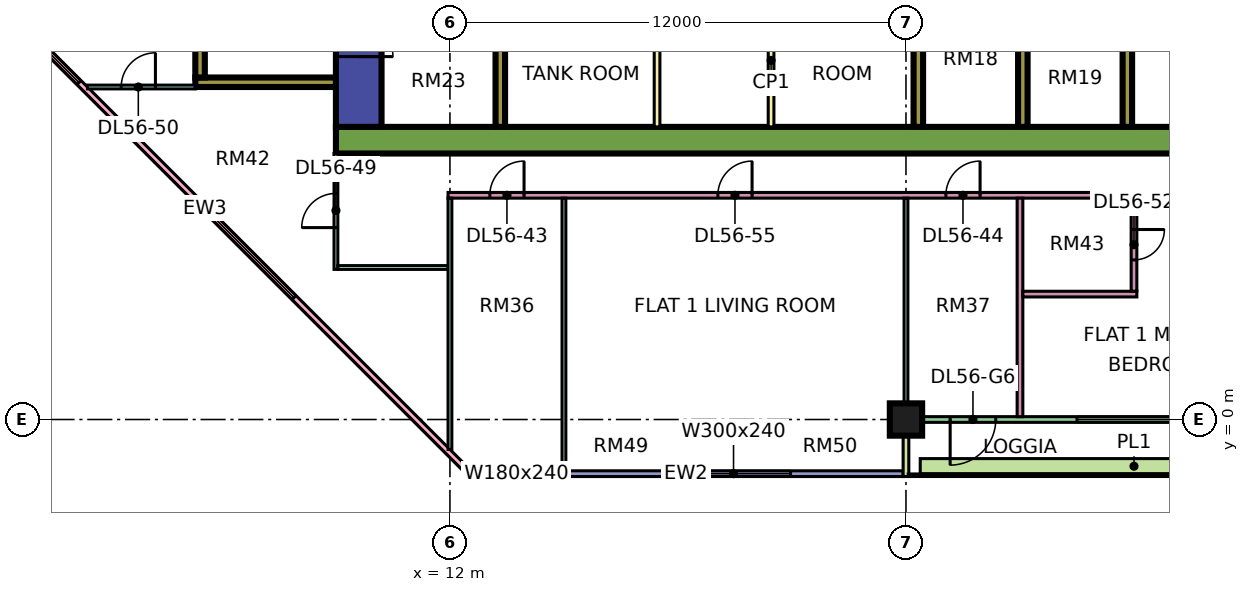
"""IFC4 building model, lengths in metres.
Left out: names, types, materials, properties, quantities, classifications, styles, units other than length and angle.
Written with IfcOpenShell. Run it as: python <this file> out.ifc"""

import sys

from ifc_helpers import new_model, si_unit, direction, frame, frame_2d, origin, origin_2d, place, context, subcontext, project, spatial, rectangle, extrude, element, fill, save


model = new_model("IFC4")
c1 = context("Model", 3, precision=1e-05, world=origin(), true_north=direction((0.0, 1.0)))
c2 = subcontext(c1, "Body", "Model", "MODEL_VIEW")
j1 = project(units=[si_unit("LENGTHUNIT", "METRE"), si_unit("PLANEANGLEUNIT", "RADIAN")], contexts=[c1])
p1 = place(None, origin())
s1 = spatial("IfcSite", under=j1, at=p1, CompositionType="ELEMENT")
p2 = place(p1, origin())
s2 = spatial("IfcBuilding", under=s1, at=p2, CompositionType="ELEMENT")
p3 = place(p2, frame((0.0, 0.0, 237.9)))
s3 = spatial("IfcBuildingStorey", under=s2, at=p3, CompositionType="ELEMENT", Elevation=237.9)
p4 = place(p3, frame((24.0, 0.0, 0.0), z_axis=(0.0, 0.0, 1.0), x_axis=(1.0, 0.0, 0.0)))
e1 = element("IfcColumn", 1, at=p4, inside=s3, PredefinedType="COLUMN", context=c2, shape_type="SweptSolid", body=[
    extrude(rectangle(XDim=0.85, YDim=0.85, at=origin_2d()), origin(), (0.0, 0.0, 1.0), 3.75),
])
p5 = place(p3, frame((9.0, 7.35, 0.0), z_axis=(0.0, 0.0, 1.0), x_axis=(1.0, 0.0, 0.0)))
e2 = element("IfcWall", 2, at=p5, inside=s3, PredefinedType="SHEAR", context=c2, shape_type="SweptSolid", body=[
    extrude(rectangle(XDim=25.0, YDim=0.7, at=frame_2d((12.5, 0.0))), origin(), (0.0, 0.0, 1.0), 3.75),
])
p6 = place(p3, frame((9.6, 7.7, 0.0), z_axis=(0.0, 0.0, 1.0), x_axis=(0.0, 1.0, 0.0)))
e3 = element("IfcWall", 3, at=p6, inside=s3, PredefinedType="SHEAR", context=c2, shape_type="SweptSolid", body=[
    extrude(rectangle(XDim=11.6, YDim=1.2, at=frame_2d((5.8, 0.0))), origin(), (0.0, 0.0, 1.0), 3.75),
])
p7 = place(p6, frame((4.175, 0.0, 0.0)))
e4 = element("IfcOpeningElement", 4, at=p7, cuts=e3, PredefinedType="OPENING", context=c2, shape_type="SweptSolid", body=[
    extrude(rectangle(XDim=1.1, YDim=2.2, at=frame_2d((0.55, 1.1))), frame((0.0, 0.61, 0.0), z_axis=(0.0, -1.0, 0.0), x_axis=(1.0, 0.0, 0.0)), (0.0, 0.0, 1.0), 1.22),
])
p8 = place(p6, frame((6.675, 0.0, 0.0)))
e5 = element("IfcOpeningElement", 5, at=p8, cuts=e3, PredefinedType="OPENING", context=c2, shape_type="SweptSolid", body=[
    extrude(rectangle(XDim=1.1, YDim=2.2, at=frame_2d((0.55, 1.1))), frame((0.0, 0.61, 0.0), z_axis=(0.0, -1.0, 0.0), x_axis=(1.0, 0.0, 0.0)), (0.0, 0.0, 1.0), 1.22),
])
p9 = place(p6, frame((9.55, 0.0, 0.0)))
e6 = element("IfcOpeningElement", 6, at=p9, cuts=e3, PredefinedType="OPENING", context=c2, shape_type="SweptSolid", body=[
    extrude(rectangle(XDim=1.1, YDim=2.2, at=frame_2d((0.55, 1.1))), frame((0.0, 0.61, 0.0), z_axis=(0.0, -1.0, 0.0), x_axis=(1.0, 0.0, 0.0)), (0.0, 0.0, 1.0), 1.22),
])
p10 = place(p6, frame((1.85, 0.0, 0.0)))
e7 = element("IfcOpeningElement", 7, at=p10, cuts=e3, PredefinedType="OPENING", context=c2, shape_type="SweptSolid", body=[
    extrude(rectangle(XDim=0.9, YDim=2.1, at=frame_2d((0.45, 1.05))), frame((0.0, 0.61, 0.0), z_axis=(0.0, -1.0, 0.0), x_axis=(1.0, 0.0, 0.0)), (0.0, 0.0, 1.0), 1.22),
])
p11 = place(p3, frame((13.325, 7.7, 0.0), z_axis=(0.0, 0.0, 1.0), x_axis=(0.0, 1.0, 0.0)))
e8 = element("IfcWall", 8, at=p11, inside=s3, PredefinedType="SHEAR", context=c2, shape_type="SweptSolid", body=[
    extrude(rectangle(XDim=11.6, YDim=0.25, at=frame_2d((5.8, 0.0))), origin(), (0.0, 0.0, 1.0), 3.75),
])
for number, where, z_axis, x_axis in (
    (9, (24.325, 7.7, 0.0), (0.0, 0.0, 1.0), (0.0, 1.0, 0.0)),
    (10, (27.075, 7.7, 0.0), (0.0, 0.0, 1.0), (0.0, 1.0, 0.0)),
    (11, (29.825, 7.7, 0.0), (0.0, 0.0, 1.0), (0.0, 1.0, 0.0)),
):
    element("IfcWall", number, at=place(p3, frame(where, z_axis=z_axis, x_axis=x_axis)), inside=s3, PredefinedType="SHEAR", context=c2, shape_type="SweptSolid", body=[
        extrude(rectangle(XDim=3.5, YDim=0.25, at=frame_2d((1.75, 0.0))), origin(), (0.0, 0.0, 1.0), 3.75),
    ])
p12 = place(p3, frame((5.3, 8.875, 0.0), z_axis=(0.0, 0.0, 1.0), x_axis=(1.0, 0.0, 0.0)))
e12 = element("IfcWall", 12, at=p12, inside=s3, PredefinedType="SHEAR", context=c2, shape_type="SweptSolid", body=[
    extrude(rectangle(XDim=3.7, YDim=0.25, at=frame_2d((1.85, 0.0))), origin(), (0.0, 0.0, 1.0), 3.75),
])
p13 = place(p3, frame((5.425, 9.0, 0.0), z_axis=(0.0, 0.0, 1.0), x_axis=(0.0, 1.0, 0.0)))
e13 = element("IfcWall", 13, at=p13, inside=s3, PredefinedType="SHEAR", context=c2, shape_type="SweptSolid", body=[
    extrude(rectangle(XDim=4.0, YDim=0.25, at=frame_2d((2.0, 0.0))), origin(), (0.0, 0.0, 1.0), 3.75),
])
p14 = place(p3, frame((-1.447, 12.553, 0.0), z_axis=(0.0, 0.0, 1.0), x_axis=(0.707106781187, -0.707106781187, 0.0)))
e14 = element("IfcWall", 14, at=p14, inside=s3, PredefinedType="SOLIDWALL", context=c2, shape_type="SweptSolid", body=[
    extrude(rectangle(XDim=19.799, YDim=0.15, at=frame_2d((9.899, 0.0))), origin(), (0.0, 0.0, 1.0), 3.35),
])
p15 = place(p14, frame((2.212, 0.0, 0.45)))
e15 = element("IfcOpeningElement", 15, at=p15, cuts=e14, PredefinedType="OPENING", context=c2, shape_type="SweptSolid", body=[
    extrude(rectangle(XDim=3.0, YDim=2.4, at=frame_2d((1.5, 1.2))), frame((0.0, 0.085, 0.0), z_axis=(0.0, -1.0, 0.0), x_axis=(1.0, 0.0, 0.0)), (0.0, 0.0, 1.0), 0.17),
])
p16 = place(p14, frame((10.216, 0.0, 0.45)))
e16 = element("IfcOpeningElement", 16, at=p16, cuts=e14, PredefinedType="OPENING", context=c2, shape_type="SweptSolid", body=[
    extrude(rectangle(XDim=3.0, YDim=2.4, at=frame_2d((1.5, 1.2))), frame((0.0, 0.085, 0.0), z_axis=(0.0, -1.0, 0.0), x_axis=(1.0, 0.0, 0.0)), (0.0, 0.0, 1.0), 0.17),
])
p17 = place(p3, frame((12.5, -1.425, 0.0), z_axis=(0.0, 0.0, 1.0), x_axis=(1.0, 0.0, 0.0)))
e17 = element("IfcWall", 17, at=p17, inside=s3, PredefinedType="SOLIDWALL", context=c2, shape_type="SweptSolid", body=[
    extrude(rectangle(XDim=11.425, YDim=0.15, at=frame_2d((5.712, 0.0))), origin(), (0.0, 0.0, 1.0), 3.35),
])
p18 = place(p17, frame((0.35, 0.0, 0.45)))
e18 = element("IfcOpeningElement", 18, at=p18, cuts=e17, PredefinedType="OPENING", context=c2, shape_type="SweptSolid", body=[
    extrude(rectangle(XDim=1.8, YDim=2.4, at=frame_2d((0.9, 1.2))), frame((0.0, 0.085, 0.0), z_axis=(0.0, -1.0, 0.0), x_axis=(1.0, 0.0, 0.0)), (0.0, 0.0, 1.0), 0.17),
])
p19 = place(p17, frame((5.462, 0.0, 0.45)))
e19 = element("IfcOpeningElement", 19, at=p19, cuts=e17, PredefinedType="OPENING", context=c2, shape_type="SweptSolid", body=[
    extrude(rectangle(XDim=3.0, YDim=2.4, at=frame_2d((1.5, 1.2))), frame((0.0, 0.085, 0.0), z_axis=(0.0, -1.0, 0.0), x_axis=(1.0, 0.0, 0.0)), (0.0, 0.0, 1.0), 0.17),
])
p20 = place(p3, frame((24.075, 0.0, 0.0), z_axis=(0.0, 0.0, 1.0), x_axis=(1.0, 0.0, 0.0)))
e20 = element("IfcWall", 20, at=p20, inside=s3, PredefinedType="SOLIDWALL", context=c2, shape_type="SweptSolid", body=[
    extrude(rectangle(XDim=11.85, YDim=0.15, at=frame_2d((5.925, 0.0))), origin(), (0.0, 0.0, 1.0), 3.35),
])
p21 = place(p20, frame((1.087, 0.0, 0.0)))
e21 = element("IfcOpeningElement", 21, at=p21, cuts=e20, PredefinedType="OPENING", context=c2, shape_type="SweptSolid", body=[
    extrude(rectangle(XDim=1.2, YDim=2.4, at=frame_2d((0.6, 1.2))), frame((0.0, 0.085, 0.0), z_axis=(0.0, -1.0, 0.0), x_axis=(1.0, 0.0, 0.0)), (0.0, 0.0, 1.0), 0.17),
])
p22 = place(p20, frame((4.425, 0.0, 0.45)))
e22 = element("IfcOpeningElement", 22, at=p22, cuts=e20, PredefinedType="OPENING", context=c2, shape_type="SweptSolid", body=[
    extrude(rectangle(XDim=3.0, YDim=2.4, at=frame_2d((1.5, 1.2))), frame((0.0, 0.085, 0.0), z_axis=(0.0, -1.0, 0.0), x_axis=(1.0, 0.0, 0.0)), (0.0, 0.0, 1.0), 0.17),
])
p23 = place(p20, frame((9.562, 0.0, 0.45)))
e23 = element("IfcOpeningElement", 23, at=p23, cuts=e20, PredefinedType="OPENING", context=c2, shape_type="SweptSolid", body=[
    extrude(rectangle(XDim=1.2, YDim=2.4, at=frame_2d((0.6, 1.2))), frame((0.0, 0.085, 0.0), z_axis=(0.0, -1.0, 0.0), x_axis=(1.0, 0.0, 0.0)), (0.0, 0.0, 1.0), 0.17),
])
p24 = place(p3, frame((24.0, -1.5, 0.0), z_axis=(0.0, 0.0, 1.0), x_axis=(0.0, 1.0, 0.0)))
e24 = element("IfcWall", 24, at=p24, inside=s3, PredefinedType="SOLIDWALL", context=c2, shape_type="SweptSolid", body=[
    extrude(rectangle(XDim=1.5, YDim=0.15, at=frame_2d((0.75, 0.0))), origin(), (0.0, 0.0, 1.0), 3.35),
])
p25 = place(p3, frame((24.375, -1.229, 0.0), z_axis=(0.0, 0.0, 1.0), x_axis=(1.0, 0.0, 0.0)))
e25 = element("IfcWall", 25, at=p25, inside=s3, PredefinedType="SOLIDWALL", context=c2, shape_type="SweptSolid", body=[
    extrude(rectangle(XDim=11.25, YDim=0.4, at=frame_2d((5.625, 0.0))), origin(), (0.0, 0.0, 1.0), 0.7),
])
for number, where, z_axis, x_axis in (
    (26, (17.45, 7.7, 0.0), (0.0, 0.0, 1.0), (0.0, 1.0, 0.0)),
    (27, (20.45, 7.7, 0.0), (0.0, 0.0, 1.0), (0.0, 1.0, 0.0)),
):
    element("IfcWall", number, at=place(p3, frame(where, z_axis=z_axis, x_axis=x_axis)), inside=s3, PredefinedType="PARTITIONING", context=c2, shape_type="SweptSolid", body=[
        extrude(rectangle(XDim=3.5, YDim=0.15, at=frame_2d((1.75, 0.0))), origin(), (0.0, 0.0, 1.0), 3.35),
    ])
p26 = place(p3, frame((2.461, 8.75, 0.0), z_axis=(0.0, 0.0, 1.0), x_axis=(1.0, 0.0, 0.0)))
e28 = element("IfcWall", 28, at=p26, inside=s3, PredefinedType="PARTITIONING", context=c2, shape_type="SweptSolid", body=[
    extrude(rectangle(XDim=2.839, YDim=0.1, at=frame_2d((1.419, 0.0))), origin(), (0.0, 0.0, 1.0), 3.35),
])
p27 = place(p26, frame((0.889, 0.0, 0.0)))
e29 = element("IfcOpeningElement", 29, at=p27, cuts=e28, PredefinedType="OPENING", context=c2, shape_type="SweptSolid", body=[
    extrude(rectangle(XDim=0.9, YDim=2.1, at=frame_2d((0.45, 1.05))), frame((0.0, 0.06, 0.0), z_axis=(0.0, -1.0, 0.0), x_axis=(1.0, 0.0, 0.0)), (0.0, 0.0, 1.0), 0.12),
])
p28 = place(p3, frame((9.0, 3.95, 0.0), z_axis=(0.0, 0.0, 1.0), x_axis=(0.0, 1.0, 0.0)))
e30 = element("IfcWall", 30, at=p28, inside=s3, PredefinedType="PARTITIONING", context=c2, shape_type="SweptSolid", body=[
    extrude(rectangle(XDim=3.05, YDim=0.1, at=frame_2d((1.525, 0.0))), origin(), (0.0, 0.0, 1.0), 3.35),
])
p29 = place(p28, frame((1.1, 0.0, 0.0)))
e31 = element("IfcOpeningElement", 31, at=p29, cuts=e30, PredefinedType="OPENING", context=c2, shape_type="SweptSolid", body=[
    extrude(rectangle(XDim=0.9, YDim=2.1, at=frame_2d((0.45, 1.05))), frame((0.0, 0.06, 0.0), z_axis=(0.0, -1.0, 0.0), x_axis=(1.0, 0.0, 0.0)), (0.0, 0.0, 1.0), 0.12),
])
p30 = place(p3, frame((9.05, 4.0, 0.0), z_axis=(0.0, 0.0, 1.0), x_axis=(1.0, 0.0, 0.0)))
e32 = element("IfcWall", 32, at=p30, inside=s3, PredefinedType="PARTITIONING", context=c2, shape_type="SweptSolid", body=[
    extrude(rectangle(XDim=2.9, YDim=0.1, at=frame_2d((1.45, 0.0))), origin(), (0.0, 0.0, 1.0), 3.35),
])
p31 = place(p3, frame((11.95, 5.9, 0.0), z_axis=(0.0, 0.0, 1.0), x_axis=(1.0, 0.0, 0.0)))
e33 = element("IfcWall", 33, at=p31, inside=s3, PredefinedType="PARTITIONING", context=c2, shape_type="SweptSolid", body=[
    extrude(rectangle(XDim=21.1, YDim=0.15, at=frame_2d((10.55, 0.0))), origin(), (0.0, 0.0, 1.0), 3.35),
])
p32 = place(p31, frame((1.1, 0.0, 0.0)))
e34 = element("IfcOpeningElement", 34, at=p32, cuts=e33, PredefinedType="OPENING", context=c2, shape_type="SweptSolid", body=[
    extrude(rectangle(XDim=0.9, YDim=2.1, at=frame_2d((0.45, 1.05))), frame((0.0, 0.085, 0.0), z_axis=(0.0, -1.0, 0.0), x_axis=(1.0, 0.0, 0.0)), (0.0, 0.0, 1.0), 0.17),
])
p33 = place(p31, frame((13.1, 0.0, 0.0)))
e35 = element("IfcOpeningElement", 35, at=p33, cuts=e33, PredefinedType="OPENING", context=c2, shape_type="SweptSolid", body=[
    extrude(rectangle(XDim=0.9, YDim=2.1, at=frame_2d((0.45, 1.05))), frame((0.0, 0.085, 0.0), z_axis=(0.0, -1.0, 0.0), x_axis=(1.0, 0.0, 0.0)), (0.0, 0.0, 1.0), 0.17),
])
p34 = place(p31, frame((7.1, 0.0, 0.0)))
e36 = element("IfcOpeningElement", 36, at=p34, cuts=e33, PredefinedType="OPENING", context=c2, shape_type="SweptSolid", body=[
    extrude(rectangle(XDim=0.9, YDim=2.1, at=frame_2d((0.45, 1.05))), frame((0.0, 0.085, 0.0), z_axis=(0.0, -1.0, 0.0), x_axis=(1.0, 0.0, 0.0)), (0.0, 0.0, 1.0), 0.17),
])
p35 = place(p3, frame((12.0, -0.788, 0.0), z_axis=(0.0, 0.0, 1.0), x_axis=(0.0, 1.0, 0.0)))
e37 = element("IfcWall", 37, at=p35, inside=s3, PredefinedType="PARTITIONING", context=c2, shape_type="SweptSolid", body=[
    extrude(rectangle(XDim=6.613, YDim=0.1, at=frame_2d((3.306, 0.0))), origin(), (0.0, 0.0, 1.0), 3.35),
])
p36 = place(p3, frame((15.0, -1.35, 0.0), z_axis=(0.0, 0.0, 1.0), x_axis=(0.0, 1.0, 0.0)))
e38 = element("IfcWall", 38, at=p36, inside=s3, PredefinedType="PARTITIONING", context=c2, shape_type="SweptSolid", body=[
    extrude(rectangle(XDim=7.175, YDim=0.1, at=frame_2d((3.587, 0.0))), origin(), (0.0, 0.0, 1.0), 3.35),
])
p37 = place(p3, frame((24.0, 0.0, 0.0), z_axis=(0.0, 0.0, 1.0), x_axis=(0.0, 1.0, 0.0)))
e39 = element("IfcWall", 39, at=p37, inside=s3, PredefinedType="PARTITIONING", context=c2, shape_type="SweptSolid", body=[
    extrude(rectangle(XDim=5.825, YDim=0.1, at=frame_2d((2.913, 0.0))), origin(), (0.0, 0.0, 1.0), 3.35),
])
p38 = place(p3, frame((27.0, 0.074, 0.0), z_axis=(0.0, 0.0, 1.0), x_axis=(0.0, 1.0, 0.0)))
e40 = element("IfcWall", 40, at=p38, inside=s3, PredefinedType="PARTITIONING", context=c2, shape_type="SweptSolid", body=[
    extrude(rectangle(XDim=5.751, YDim=0.15, at=frame_2d((2.875, 0.0))), origin(), (0.0, 0.0, 1.0), 3.35),
])
p39 = place(p3, frame((27.075, 3.3, 0.0), z_axis=(0.0, 0.0, 1.0), x_axis=(1.0, 0.0, 0.0)))
e41 = element("IfcWall", 41, at=p39, inside=s3, PredefinedType="PARTITIONING", context=c2, shape_type="SweptSolid", body=[
    extrude(rectangle(XDim=3.0, YDim=0.15, at=frame_2d((1.5, 0.0))), origin(), (0.0, 0.0, 1.0), 3.35),
])
p40 = place(p3, frame((30.0, 3.375, 0.0), z_axis=(0.0, 0.0, 1.0), x_axis=(0.0, 1.0, 0.0)))
e42 = element("IfcWall", 42, at=p40, inside=s3, PredefinedType="PARTITIONING", context=c2, shape_type="SweptSolid", body=[
    extrude(rectangle(XDim=2.45, YDim=0.15, at=frame_2d((1.225, 0.0))), origin(), (0.0, 0.0, 1.0), 3.35),
])
p41 = place(p40, frame((0.825, 0.0, 0.0)))
e43 = element("IfcOpeningElement", 43, at=p41, cuts=e42, PredefinedType="OPENING", context=c2, shape_type="SweptSolid", body=[
    extrude(rectangle(XDim=0.8, YDim=2.1, at=frame_2d((0.4, 1.05))), frame((0.0, 0.085, 0.0), z_axis=(0.0, -1.0, 0.0), x_axis=(1.0, 0.0, 0.0)), (0.0, 0.0, 1.0), 0.17),
])
p42 = place(p15, origin())
e44 = element("IfcWindow", 44, at=p42, inside=s3, PartitioningType="SINGLE_PANEL", PredefinedType="WINDOW", context=c2, shape_type="SweptSolid", body=[
    extrude(rectangle(XDim=3.0, YDim=2.4, at=frame_2d((1.5, 1.2))), frame((0.0, 0.03, 0.0), z_axis=(0.0, -1.0, 0.0), x_axis=(1.0, 0.0, 0.0)), (0.0, 0.0, 1.0), 0.06),
])
fill(e15, e44)
p43 = place(p16, origin())
e45 = element("IfcWindow", 45, at=p43, inside=s3, PartitioningType="SINGLE_PANEL", PredefinedType="WINDOW", context=c2, shape_type="SweptSolid", body=[
    extrude(rectangle(XDim=3.0, YDim=2.4, at=frame_2d((1.5, 1.2))), frame((0.0, 0.03, 0.0), z_axis=(0.0, -1.0, 0.0), x_axis=(1.0, 0.0, 0.0)), (0.0, 0.0, 1.0), 0.06),
])
fill(e16, e45)
p44 = place(p18, origin())
e46 = element("IfcWindow", 46, at=p44, inside=s3, PartitioningType="SINGLE_PANEL", PredefinedType="WINDOW", context=c2, shape_type="SweptSolid", body=[
    extrude(rectangle(XDim=1.8, YDim=2.4, at=frame_2d((0.9, 1.2))), frame((0.0, 0.03, 0.0), z_axis=(0.0, -1.0, 0.0), x_axis=(1.0, 0.0, 0.0)), (0.0, 0.0, 1.0), 0.06),
])
fill(e18, e46)
p45 = place(p19, origin())
e47 = element("IfcWindow", 47, at=p45, inside=s3, PartitioningType="SINGLE_PANEL", PredefinedType="WINDOW", context=c2, shape_type="SweptSolid", body=[
    extrude(rectangle(XDim=3.0, YDim=2.4, at=frame_2d((1.5, 1.2))), frame((0.0, 0.03, 0.0), z_axis=(0.0, -1.0, 0.0), x_axis=(1.0, 0.0, 0.0)), (0.0, 0.0, 1.0), 0.06),
])
fill(e19, e47)
p46 = place(p21, frame((1.2, 0.0, 0.0), z_axis=(0.0, 0.0, 1.0), x_axis=(-1.0, 0.0, 0.0)))
e48 = element("IfcDoor", 48, at=p46, inside=s3, OperationType="DOUBLE_DOOR_SINGLE_SWING", PredefinedType="DOOR", context=c2, shape_type="SweptSolid", body=[
    extrude(rectangle(XDim=1.2, YDim=2.4, at=frame_2d((0.6, 1.2))), frame((0.0, 0.025, 0.0), z_axis=(0.0, -1.0, 0.0), x_axis=(1.0, 0.0, 0.0)), (0.0, 0.0, 1.0), 0.05),
])
fill(e21, e48)
p47 = place(p22, origin())
e49 = element("IfcWindow", 49, at=p47, inside=s3, PartitioningType="SINGLE_PANEL", PredefinedType="WINDOW", context=c2, shape_type="SweptSolid", body=[
    extrude(rectangle(XDim=3.0, YDim=2.4, at=frame_2d((1.5, 1.2))), frame((0.0, 0.03, 0.0), z_axis=(0.0, -1.0, 0.0), x_axis=(1.0, 0.0, 0.0)), (0.0, 0.0, 1.0), 0.06),
])
fill(e22, e49)
p48 = place(p10, frame((0.9, 0.0, 0.0), z_axis=(0.0, 0.0, 1.0), x_axis=(-1.0, 0.0, 0.0)))
e50 = element("IfcDoor", 50, at=p48, inside=s3, OperationType="SINGLE_SWING_LEFT", PredefinedType="DOOR", context=c2, shape_type="SweptSolid", body=[
    extrude(rectangle(XDim=0.9, YDim=2.1, at=frame_2d((0.45, 1.05))), frame((0.0, 0.025, 0.0), z_axis=(0.0, -1.0, 0.0), x_axis=(1.0, 0.0, 0.0)), (0.0, 0.0, 1.0), 0.05),
])
fill(e7, e50)
p49 = place(p32, frame((0.9, 0.0, 0.0), z_axis=(0.0, 0.0, 1.0), x_axis=(-1.0, 0.0, 0.0)))
e51 = element("IfcDoor", 51, at=p49, inside=s3, OperationType="SINGLE_SWING_RIGHT", PredefinedType="DOOR", context=c2, shape_type="SweptSolid", body=[
    extrude(rectangle(XDim=0.9, YDim=2.1, at=frame_2d((0.45, 1.05))), frame((0.0, 0.025, 0.0), z_axis=(0.0, -1.0, 0.0), x_axis=(1.0, 0.0, 0.0)), (0.0, 0.0, 1.0), 0.05),
])
fill(e34, e51)
p50 = place(p33, frame((0.9, 0.0, 0.0), z_axis=(0.0, 0.0, 1.0), x_axis=(-1.0, 0.0, 0.0)))
e52 = element("IfcDoor", 52, at=p50, inside=s3, OperationType="SINGLE_SWING_RIGHT", PredefinedType="DOOR", context=c2, shape_type="SweptSolid", body=[
    extrude(rectangle(XDim=0.9, YDim=2.1, at=frame_2d((0.45, 1.05))), frame((0.0, 0.025, 0.0), z_axis=(0.0, -1.0, 0.0), x_axis=(1.0, 0.0, 0.0)), (0.0, 0.0, 1.0), 0.05),
])
fill(e35, e52)
p51 = place(p29, origin())
e53 = element("IfcDoor", 53, at=p51, inside=s3, OperationType="SINGLE_SWING_LEFT", PredefinedType="DOOR", context=c2, shape_type="SweptSolid", body=[
    extrude(rectangle(XDim=0.9, YDim=2.1, at=frame_2d((0.45, 1.05))), frame((0.0, 0.025, 0.0), z_axis=(0.0, -1.0, 0.0), x_axis=(1.0, 0.0, 0.0)), (0.0, 0.0, 1.0), 0.05),
])
fill(e31, e53)
p52 = place(p27, frame((0.9, 0.0, 0.0), z_axis=(0.0, 0.0, 1.0), x_axis=(-1.0, 0.0, 0.0)))
e54 = element("IfcDoor", 54, at=p52, inside=s3, OperationType="SINGLE_SWING_RIGHT", PredefinedType="DOOR", context=c2, shape_type="SweptSolid", body=[
    extrude(rectangle(XDim=0.9, YDim=2.1, at=frame_2d((0.45, 1.05))), frame((0.0, 0.025, 0.0), z_axis=(0.0, -1.0, 0.0), x_axis=(1.0, 0.0, 0.0)), (0.0, 0.0, 1.0), 0.05),
])
fill(e29, e54)
p53 = place(p41, origin())
e55 = element("IfcDoor", 55, at=p53, inside=s3, OperationType="SINGLE_SWING_RIGHT", PredefinedType="DOOR", context=c2, shape_type="SweptSolid", body=[
    extrude(rectangle(XDim=0.8, YDim=2.1, at=frame_2d((0.4, 1.05))), frame((0.0, 0.025, 0.0), z_axis=(0.0, -1.0, 0.0), x_axis=(1.0, 0.0, 0.0)), (0.0, 0.0, 1.0), 0.05),
])
fill(e43, e55)
p54 = place(p34, frame((0.9, 0.0, 0.0), z_axis=(0.0, 0.0, 1.0), x_axis=(-1.0, 0.0, 0.0)))
e56 = element("IfcDoor", 56, at=p54, inside=s3, OperationType="SINGLE_SWING_RIGHT", PredefinedType="DOOR", context=c2, shape_type="SweptSolid", body=[
    extrude(rectangle(XDim=0.9, YDim=2.1, at=frame_2d((0.45, 1.05))), frame((0.0, 0.025, 0.0), z_axis=(0.0, -1.0, 0.0), x_axis=(1.0, 0.0, 0.0)), (0.0, 0.0, 1.0), 0.05),
])
fill(e36, e56)
save(model, sys.argv[1])
